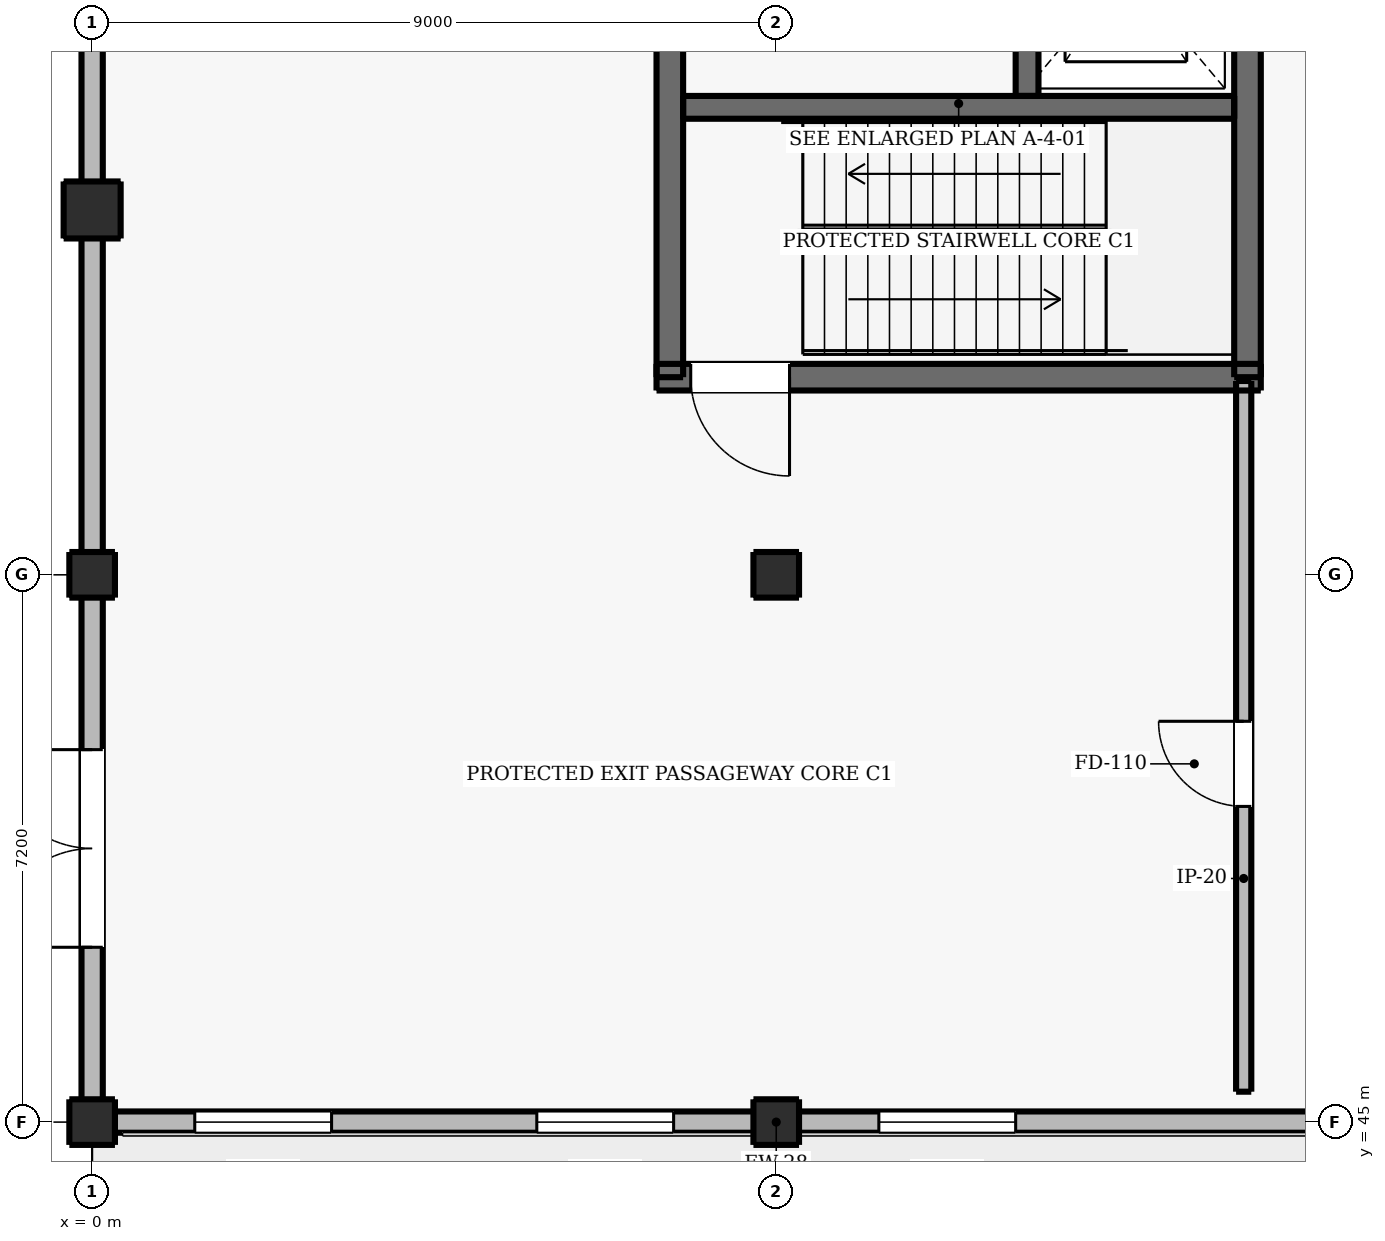
"""IFC4 building model, lengths in metres.
Left out: names, types, materials, properties, quantities, classifications, styles, units other than length and angle.
Written with IfcOpenShell. Run it as: python <this file> out.ifc"""

import sys

from ifc_helpers import new_model, si_unit, direction, frame, frame_2d, origin, origin_2d, place, context, subcontext, project, spatial, rectangle, extrude, element, fill, save


model = new_model("IFC4")
c1 = context("Model", 3, precision=1e-05, world=origin(), true_north=direction((0.0, 1.0)))
c2 = subcontext(c1, "Body", "Model", "MODEL_VIEW")
j1 = project(units=[si_unit("LENGTHUNIT", "METRE"), si_unit("PLANEANGLEUNIT", "RADIAN")], contexts=[c1])
p1 = place(None, origin())
s1 = spatial("IfcSite", under=j1, at=p1, CompositionType="ELEMENT")
p2 = place(p1, origin())
s2 = spatial("IfcBuilding", under=s1, at=p2, CompositionType="ELEMENT")
p3 = place(p2, origin())
s3 = spatial("IfcBuildingStorey", under=s2, at=p3, CompositionType="ELEMENT", Elevation=0.0)
for number, where, z_axis, x_axis in (
    (1, (0.0, 45.0, 0.0), (0.0, 0.0, 1.0), (1.0, 0.0, 0.0)),
    (2, (0.0, 52.2, 0.0), (0.0, 0.0, 1.0), (1.0, 0.0, 0.0)),
):
    element("IfcColumn", number, at=place(p3, frame(where, z_axis=z_axis, x_axis=x_axis)), inside=s3, PredefinedType="COLUMN", context=c2, shape_type="SweptSolid", body=[
        extrude(rectangle(XDim=0.6, YDim=0.6, at=origin_2d()), origin(), (0.0, 0.0, 1.0), 5.1),
    ])
p4 = place(p3, frame((0.0, 57.0, 0.0), z_axis=(0.0, 0.0, 1.0), x_axis=(1.0, 0.0, 0.0)))
e3 = element("IfcColumn", 3, at=p4, inside=s3, PredefinedType="PILASTER", context=c2, shape_type="SweptSolid", body=[
    extrude(rectangle(XDim=0.75, YDim=0.75, at=origin_2d()), origin(), (0.0, 0.0, 1.0), 5.1),
])
for number, where, z_axis, x_axis in (
    (4, (9.0, 45.0, 0.0), (0.0, 0.0, 1.0), (1.0, 0.0, 0.0)),
    (5, (9.0, 52.2, 0.0), (0.0, 0.0, 1.0), (1.0, 0.0, 0.0)),
):
    element("IfcColumn", number, at=place(p3, frame(where, z_axis=z_axis, x_axis=x_axis)), inside=s3, PredefinedType="COLUMN", context=c2, shape_type="SweptSolid", body=[
        extrude(rectangle(XDim=0.6, YDim=0.6, at=origin_2d()), origin(), (0.0, 0.0, 1.0), 5.1),
    ])
p5 = place(p3, frame((7.425, 54.8, 0.0), z_axis=(0.0, 0.0, 1.0), x_axis=(1.0, 0.0, 0.0)))
e6 = element("IfcWall", 6, at=p5, inside=s3, PredefinedType="SHEAR", context=c2, shape_type="SweptSolid", body=[
    extrude(rectangle(XDim=7.95, YDim=0.35, at=frame_2d((3.975, 0.0))), origin(), (0.0, 0.0, 1.0), 5.1),
])
p6 = place(p5, frame((0.45, 0.0, 0.0)))
e7 = element("IfcOpeningElement", 7, at=p6, cuts=e6, PredefinedType="OPENING", context=c2, shape_type="SweptSolid", body=[
    extrude(rectangle(XDim=1.3, YDim=2.15, at=frame_2d((0.65, 1.075))), frame((0.0, 0.185, 0.0), z_axis=(0.0, -1.0, 0.0), x_axis=(1.0, 0.0, 0.0)), (0.0, 0.0, 1.0), 0.37),
])
for number, where, z_axis, x_axis in (
    (8, (7.6, 54.8, 0.0), (0.0, 0.0, 1.0), (0.0, 1.0, 0.0)),
    (9, (15.2, 54.8, 0.0), (0.0, 0.0, 1.0), (0.0, 1.0, 0.0)),
):
    element("IfcWall", number, at=place(p3, frame(where, z_axis=z_axis, x_axis=x_axis)), inside=s3, PredefinedType="SHEAR", context=c2, shape_type="SweptSolid", body=[
        extrude(rectangle(XDim=7.2, YDim=0.35, at=frame_2d((3.6, 0.0))), origin(), (0.0, 0.0, 1.0), 5.1),
    ])
p7 = place(p3, frame((7.775, 58.35, 0.0), z_axis=(0.0, 0.0, 1.0), x_axis=(1.0, 0.0, 0.0)))
e10 = element("IfcWall", 10, at=p7, inside=s3, PredefinedType="SHEAR", context=c2, shape_type="SweptSolid", body=[
    extrude(rectangle(XDim=7.25, YDim=0.3, at=frame_2d((3.625, 0.0))), origin(), (0.0, 0.0, 1.0), 5.1),
])
p8 = place(p3, frame((12.3, 58.5, 0.0), z_axis=(0.0, 0.0, 1.0), x_axis=(0.0, 1.0, 0.0)))
e11 = element("IfcWall", 11, at=p8, inside=s3, PredefinedType="SHEAR", context=c2, shape_type="SweptSolid", body=[
    extrude(rectangle(XDim=3.325, YDim=0.3, at=frame_2d((1.663, 0.0))), origin(), (0.0, 0.0, 1.0), 5.1),
])
p9 = place(p8, frame((1.113, 0.0, 0.0)))
e12 = element("IfcOpeningElement", 12, at=p9, cuts=e11, PredefinedType="OPENING", context=c2, shape_type="SweptSolid", body=[
    extrude(rectangle(XDim=1.1, YDim=2.15, at=frame_2d((0.55, 1.075))), frame((0.0, 0.16, 0.0), z_axis=(0.0, -1.0, 0.0), x_axis=(1.0, 0.0, 0.0)), (0.0, 0.0, 1.0), 0.32),
])
p10 = place(p3, frame((0.0, 45.0, 0.0), z_axis=(0.0, 0.0, 1.0), x_axis=(0.0, 1.0, 0.0)))
e13 = element("IfcWall", 13, at=p10, inside=s3, PredefinedType="SOLIDWALL", context=c2, shape_type="SweptSolid", body=[
    extrude(rectangle(XDim=50.8, YDim=0.28, at=frame_2d((25.4, 0.0))), origin(), (0.0, 0.0, 1.0), 4.16),
])
p11 = place(p10, frame((2.3, 0.0, 0.0)))
e14 = element("IfcOpeningElement", 14, at=p11, cuts=e13, PredefinedType="OPENING", context=c2, shape_type="SweptSolid", body=[
    extrude(rectangle(XDim=2.6, YDim=2.6, at=frame_2d((1.3, 1.3))), frame((0.0, 0.15, 0.0), z_axis=(0.0, -1.0, 0.0), x_axis=(1.0, 0.0, 0.0)), (0.0, 0.0, 1.0), 0.3),
])
p12 = place(p3, frame((18.0, 45.0, 0.0), z_axis=(0.0, 0.0, 1.0), x_axis=(-1.0, 0.0, 0.0)))
e15 = element("IfcWall", 15, at=p12, inside=s3, PredefinedType="SOLIDWALL", context=c2, shape_type="SweptSolid", body=[
    extrude(rectangle(XDim=18.0, YDim=0.28, at=frame_2d((9.0, 0.0))), origin(), (0.0, 0.0, 1.0), 4.01),
])
p13 = place(p12, frame((5.85, 0.0, 1.05)))
e16 = element("IfcOpeningElement", 16, at=p13, cuts=e15, PredefinedType="OPENING", context=c2, shape_type="SweptSolid", body=[
    extrude(rectangle(XDim=1.8, YDim=1.65, at=frame_2d((0.9, 0.825))), frame((0.0, 0.15, 0.0), z_axis=(0.0, -1.0, 0.0), x_axis=(1.0, 0.0, 0.0)), (0.0, 0.0, 1.0), 0.3),
])
p14 = place(p12, frame((10.35, 0.0, 1.05)))
e17 = element("IfcOpeningElement", 17, at=p14, cuts=e15, PredefinedType="OPENING", context=c2, shape_type="SweptSolid", body=[
    extrude(rectangle(XDim=1.8, YDim=1.65, at=frame_2d((0.9, 0.825))), frame((0.0, 0.15, 0.0), z_axis=(0.0, -1.0, 0.0), x_axis=(1.0, 0.0, 0.0)), (0.0, 0.0, 1.0), 0.3),
])
p15 = place(p12, frame((14.85, 0.0, 1.05)))
e18 = element("IfcOpeningElement", 18, at=p15, cuts=e15, PredefinedType="OPENING", context=c2, shape_type="SweptSolid", body=[
    extrude(rectangle(XDim=1.8, YDim=1.65, at=frame_2d((0.9, 0.825))), frame((0.0, 0.15, 0.0), z_axis=(0.0, -1.0, 0.0), x_axis=(1.0, 0.0, 0.0)), (0.0, 0.0, 1.0), 0.3),
])
p16 = place(p3, frame((15.15, 45.4, 0.0), z_axis=(0.0, 0.0, 1.0), x_axis=(0.0, 1.0, 0.0)))
e19 = element("IfcWall", 19, at=p16, inside=s3, PredefinedType="PARTITIONING", context=c2, shape_type="SweptSolid", body=[
    extrude(rectangle(XDim=9.35, YDim=0.2, at=frame_2d((4.675, 0.0))), origin(), (0.0, 0.0, 1.0), 4.32),
])
p17 = place(p16, frame((3.753, 0.0, 0.0)))
e20 = element("IfcOpeningElement", 20, at=p17, cuts=e19, PredefinedType="OPENING", context=c2, shape_type="SweptSolid", body=[
    extrude(rectangle(XDim=1.12, YDim=2.15, at=frame_2d((0.56, 1.075))), frame((0.0, 0.11, 0.0), z_axis=(0.0, -1.0, 0.0), x_axis=(1.0, 0.0, 0.0)), (0.0, 0.0, 1.0), 0.22),
])
p18 = place(p11, origin())
e21 = element("IfcDoor", 21, at=p18, inside=s3, OperationType="DOUBLE_DOOR_SINGLE_SWING", PredefinedType="DOOR", context=c2, shape_type="SweptSolid", body=[
    extrude(rectangle(XDim=2.6, YDim=2.6, at=frame_2d((1.3, 1.3))), frame((0.0, 0.025, 0.0), z_axis=(0.0, -1.0, 0.0), x_axis=(1.0, 0.0, 0.0)), (0.0, 0.0, 1.0), 0.05),
])
fill(e14, e21)
p19 = place(p13, origin())
e22 = element("IfcWindow", 22, at=p19, inside=s3, PartitioningType="SINGLE_PANEL", PredefinedType="WINDOW", context=c2, shape_type="SweptSolid", body=[
    extrude(rectangle(XDim=1.8, YDim=1.65, at=frame_2d((0.9, 0.825))), frame((0.0, 0.03, 0.0), z_axis=(0.0, -1.0, 0.0), x_axis=(1.0, 0.0, 0.0)), (0.0, 0.0, 1.0), 0.06),
])
fill(e16, e22)
p20 = place(p14, origin())
e23 = element("IfcWindow", 23, at=p20, inside=s3, PartitioningType="SINGLE_PANEL", PredefinedType="WINDOW", context=c2, shape_type="SweptSolid", body=[
    extrude(rectangle(XDim=1.8, YDim=1.65, at=frame_2d((0.9, 0.825))), frame((0.0, 0.03, 0.0), z_axis=(0.0, -1.0, 0.0), x_axis=(1.0, 0.0, 0.0)), (0.0, 0.0, 1.0), 0.06),
])
fill(e17, e23)
p21 = place(p15, origin())
e24 = element("IfcWindow", 24, at=p21, inside=s3, PartitioningType="SINGLE_PANEL", PredefinedType="WINDOW", context=c2, shape_type="SweptSolid", body=[
    extrude(rectangle(XDim=1.8, YDim=1.65, at=frame_2d((0.9, 0.825))), frame((0.0, 0.03, 0.0), z_axis=(0.0, -1.0, 0.0), x_axis=(1.0, 0.0, 0.0)), (0.0, 0.0, 1.0), 0.06),
])
fill(e18, e24)
p22 = place(p6, frame((1.3, 0.0, 0.0), z_axis=(0.0, 0.0, 1.0), x_axis=(-1.0, 0.0, 0.0)))
e25 = element("IfcDoor", 25, at=p22, inside=s3, OperationType="SINGLE_SWING_RIGHT", PredefinedType="DOOR", context=c2, shape_type="SweptSolid", body=[
    extrude(rectangle(XDim=1.3, YDim=2.15, at=frame_2d((0.65, 1.075))), frame((0.0, 0.025, 0.0), z_axis=(0.0, -1.0, 0.0), x_axis=(1.0, 0.0, 0.0)), (0.0, 0.0, 1.0), 0.05),
])
fill(e7, e25)
p23 = place(p17, origin())
e26 = element("IfcDoor", 26, at=p23, inside=s3, OperationType="SINGLE_SWING_RIGHT", PredefinedType="DOOR", context=c2, shape_type="SweptSolid", body=[
    extrude(rectangle(XDim=1.12, YDim=2.15, at=frame_2d((0.56, 1.075))), frame((0.0, 0.025, 0.0), z_axis=(0.0, -1.0, 0.0), x_axis=(1.0, 0.0, 0.0)), (0.0, 0.0, 1.0), 0.05),
])
fill(e20, e26)
save(model, sys.argv[1])
